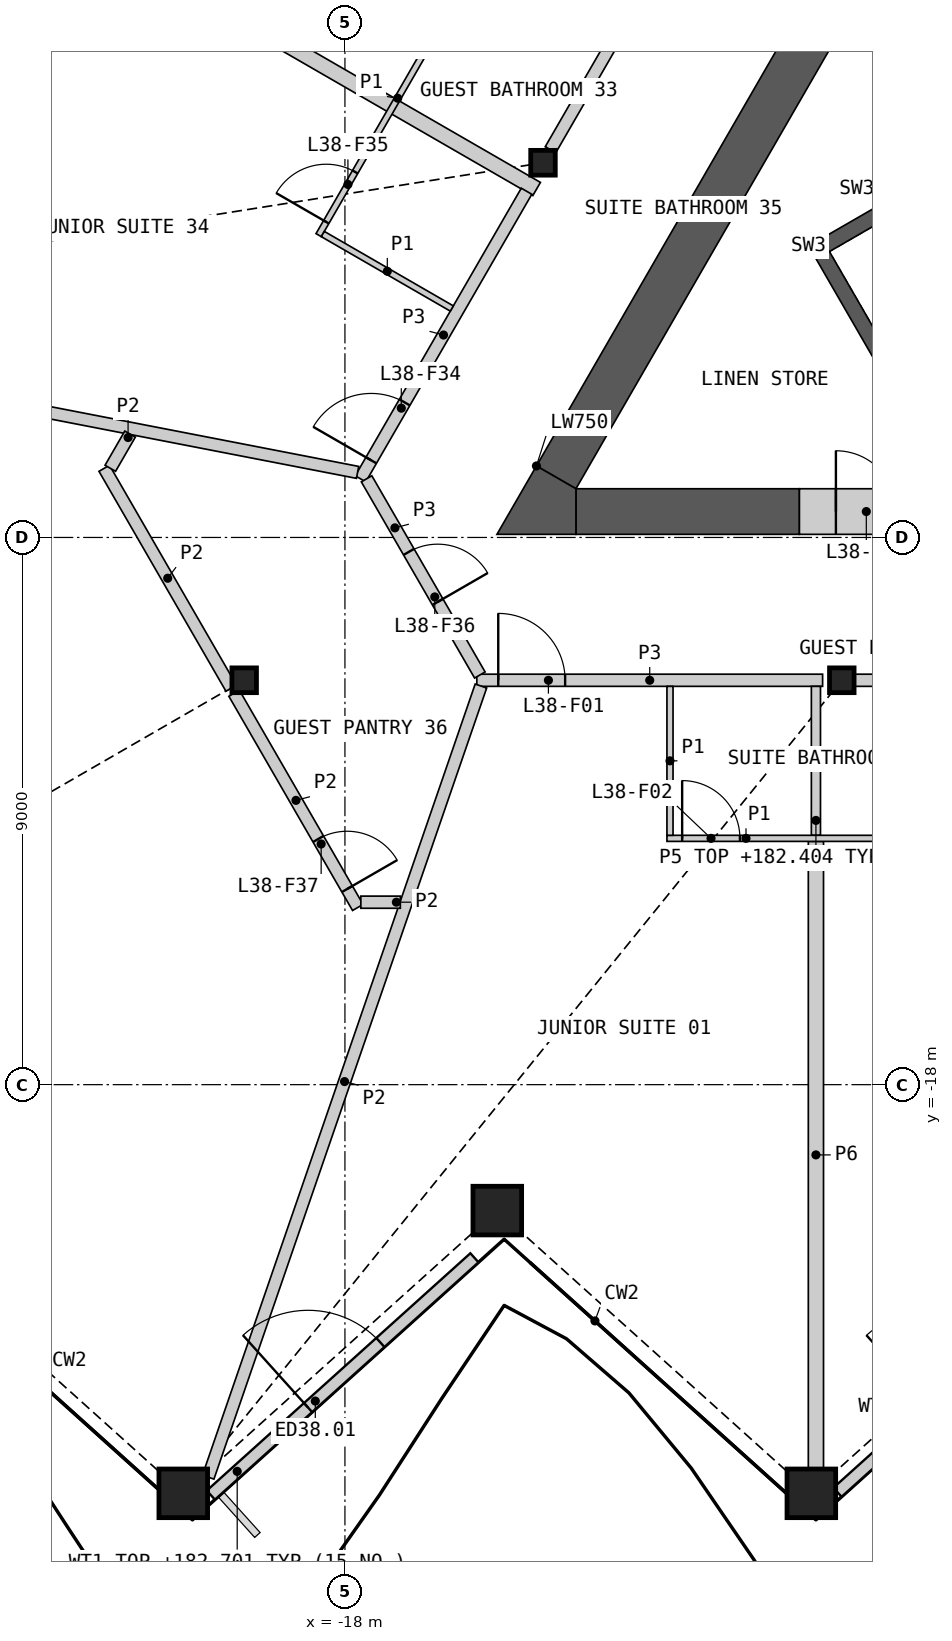
"""IFC4 building model, lengths in metres.
Left out: names, types, materials, properties, quantities, classifications, styles, units other than length and angle.
Written with IfcOpenShell. Run it as: python <this file> out.ifc"""

import sys

from ifc_helpers import new_model, si_unit, direction, frame, frame_2d, origin, origin_2d, place, context, subcontext, project, spatial, polyline, rectangle, hollow_rectangle, i_section, outline, extrude, element, fill, save


model = new_model("IFC4")
c1 = context("Model", 3, precision=1e-05, world=origin(), true_north=direction((0.0, 1.0)))
c2 = subcontext(c1, "Body", "Model", "MODEL_VIEW")
j1 = project(units=[si_unit("LENGTHUNIT", "METRE"), si_unit("PLANEANGLEUNIT", "RADIAN")], contexts=[c1])
p1 = place(None, origin())
s1 = spatial("IfcSite", under=j1, at=p1, CompositionType="ELEMENT")
p2 = place(p1, origin())
s2 = spatial("IfcBuilding", under=s1, at=p2, CompositionType="ELEMENT")
p3 = place(p2, frame((0.0, 0.0, 180.0)))
s3 = spatial("IfcBuildingStorey", under=s2, at=p3, CompositionType="ELEMENT", Elevation=180.0)
for number, where, z_axis, x_axis in (
    (1, (-20.659, -24.722, 0.0), (0.0, 0.0, 1.0), (1.0, 0.0, 0.0)),
    (2, (-15.494, -20.071, 0.0), (0.0, 0.0, 1.0), (1.0, 0.0, 0.0)),
    (3, (-10.329, -24.722, 0.0), (0.0, 0.0, 1.0), (1.0, 0.0, 0.0)),
):
    element("IfcColumn", number, at=place(p3, frame(where, z_axis=z_axis, x_axis=x_axis)), inside=s3, PredefinedType="COLUMN", context=c2, shape_type="SweptSolid", body=[
        extrude(hollow_rectangle(XDim=0.8, YDim=0.8, WallThickness=0.05, at=origin_2d()), origin(), (0.0, 0.0, 1.0), 3.6),
    ])
for number, where, z_axis, x_axis in (
    (4, (-14.743, -2.837, 0.0), (0.0, 0.0, 1.0), (1.0, 0.0, 0.0)),
    (5, (-19.657, -11.349, 0.0), (0.0, 0.0, 1.0), (1.0, 0.0, 0.0)),
    (6, (-9.828, -11.349, 0.0), (0.0, 0.0, 1.0), (1.0, 0.0, 0.0)),
):
    element("IfcColumn", number, at=place(p3, frame(where, z_axis=z_axis, x_axis=x_axis)), inside=s3, PredefinedType="COLUMN", context=c2, shape_type="SweptSolid", body=[
        extrude(i_section(OverallWidth=0.404, OverallDepth=0.407, WebThickness=0.027, FlangeThickness=0.044, at=origin_2d()), origin(), (0.0, 0.0, 1.0), 3.6),
    ])
p4 = place(p3, frame((-20.205, -24.751, 0.0), z_axis=(0.0, 0.0, 1.0), x_axis=(0.743135964011, 0.669140447883, 0.0)))
e7 = element("IfcWall", 7, at=p4, inside=s3, PredefinedType="SOLIDWALL", context=c2, shape_type="SweptSolid", body=[
    extrude(rectangle(XDim=5.833, YDim=0.2, at=frame_2d((2.917, 0.0))), origin(), (0.0, 0.0, 1.0), 2.701),
])
p5 = place(p4, frame((2.152, 0.0, 0.0)))
e8 = element("IfcOpeningElement", 8, at=p5, cuts=e7, PredefinedType="OPENING", context=c2, shape_type="SweptSolid", body=[
    extrude(rectangle(XDim=1.6, YDim=2.4, at=frame_2d((0.8, 1.2))), frame((0.0, 0.11, 0.0), z_axis=(0.0, -1.0, 0.0), x_axis=(1.0, 0.0, 0.0)), (0.0, 0.0, 1.0), 0.22),
])
p6 = place(p3, frame((-9.899, -24.704, 0.0), z_axis=(0.0, 0.0, 1.0), x_axis=(0.74312139518, 0.669156627424, 0.0)))
e9 = element("IfcWall", 9, at=p6, inside=s3, PredefinedType="SOLIDWALL", context=c2, shape_type="SweptSolid", body=[
    extrude(rectangle(XDim=5.763, YDim=0.2, at=frame_2d((2.882, 0.0))), origin(), (0.0, 0.0, 1.0), 2.701),
])
p7 = place(p6, frame((2.082, 0.0, 0.0)))
e10 = element("IfcOpeningElement", 10, at=p7, cuts=e9, PredefinedType="OPENING", context=c2, shape_type="SweptSolid", body=[
    extrude(rectangle(XDim=1.6, YDim=2.4, at=frame_2d((0.8, 1.2))), frame((0.0, 0.11, 0.0), z_axis=(0.0, -1.0, 0.0), x_axis=(1.0, 0.0, 0.0)), (0.0, 0.0, 1.0), 0.22),
])
p8 = place(p3, origin())
e11 = element("IfcWall", 11, at=p8, inside=s3, PredefinedType="SHEAR", context=c2, shape_type="SweptSolid", body=[
    extrude(outline(polyline([(-5.307, -1.281), (-10.374, -4.206), (-10.032, -4.298), (-5.182, -1.498), (-5.307, -1.281)])), origin(), (0.0, 0.0, 1.0), 3.25),
])
p9 = place(p3, origin())
e12 = element("IfcWall", 12, at=p9, inside=s3, PredefinedType="SHEAR", context=c2, shape_type="SweptSolid", body=[
    extrude(outline(polyline([(-10.374, -4.206), (-8.83, -6.881), (-8.738, -6.539), (-10.032, -4.298), (-10.374, -4.206)])), origin(), (0.0, 0.0, 1.0), 3.25),
])
p10 = place(p3, frame((-14.201, -8.574, 0.0), z_axis=(0.0, 0.0, 1.0), x_axis=(1.0, 0.0, 0.0)))
e13 = element("IfcWall", 13, at=p10, inside=s3, PredefinedType="SHEAR", context=c2, shape_type="SweptSolid", body=[
    extrude(rectangle(XDim=3.676, YDim=0.75, at=frame_2d((1.838, 0.0))), origin(), (0.0, 0.0, 1.0), 3.25),
])
p11 = place(p3, frame((-9.625, 0.477, 0.0), z_axis=(0.0, 0.0, 1.0), x_axis=(-0.499986234705, -0.866033351035, 0.0)))
e14 = element("IfcWall", 14, at=p11, inside=s3, PredefinedType="SHEAR", context=c2, shape_type="SweptSolid", body=[
    extrude(rectangle(XDim=9.801, YDim=0.75, at=frame_2d((4.9, 0.0))), origin(), (0.0, 0.0, 1.0), 3.25),
])
p12 = place(p3, origin())
e15 = element("IfcWall", 15, at=p12, inside=s3, PredefinedType="SHEAR", context=c2, shape_type="SweptSolid", body=[
    extrude(outline(polyline([(-14.851, -7.824), (-14.201, -8.199), (-14.201, -8.949), (-15.5, -8.949), (-14.851, -7.824)])), origin(), (0.0, 0.0, 1.0), 3.25),
])
p13 = place(p3, frame((-10.525, -8.574, 0.0), z_axis=(0.0, 0.0, 1.0), x_axis=(1.0, 0.0, 0.0)))
e16 = element("IfcWall", 16, at=p13, inside=s3, PredefinedType="SHEAR", context=c2, shape_type="SweptSolid", body=[
    extrude(rectangle(XDim=2.2, YDim=0.75, at=frame_2d((1.1, 0.0))), origin(), (0.0, 0.0, 1.0), 3.25),
])
p14 = place(p13, frame((0.6, 0.0, 0.0)))
e17 = element("IfcOpeningElement", 17, at=p14, cuts=e16, PredefinedType="OPENING", context=c2, shape_type="SweptSolid", body=[
    extrude(rectangle(XDim=1.0, YDim=2.1, at=frame_2d((0.5, 1.05))), frame((0.0, 0.385, 0.0), z_axis=(0.0, -1.0, 0.0), x_axis=(1.0, 0.0, 0.0)), (0.0, 0.0, 1.0), 0.77),
])
p15 = place(p3, frame((-26.164, 3.265, 0.0), z_axis=(0.0, 0.0, 1.0), x_axis=(0.866021313335, -0.500007084799, 0.0)))
e18 = element("IfcWall", 18, at=p15, inside=s3, PredefinedType="PARTITIONING", context=c2, shape_type="SweptSolid", body=[
    extrude(rectangle(XDim=13.068, YDim=0.25, at=frame_2d((6.534, 0.0))), origin(), (0.0, 0.0, 1.0), 2.404),
])
p16 = place(p3, frame((-10.254, -24.312, 0.0), z_axis=(0.0, 0.0, 1.0), x_axis=(0.0, 1.0, 0.0)))
e19 = element("IfcWall", 19, at=p16, inside=s3, PredefinedType="PARTITIONING", context=c2, shape_type="SweptSolid", body=[
    extrude(rectangle(XDim=10.313, YDim=0.25, at=frame_2d((5.156, 0.0))), origin(), (0.0, 0.0, 1.0), 2.404),
])
p17 = place(p3, frame((-9.615, -11.349, 0.0), z_axis=(0.0, 0.0, 1.0), x_axis=(1.0, 0.0, 0.0)))
e20 = element("IfcWall", 20, at=p17, inside=s3, PredefinedType="PARTITIONING", context=c2, shape_type="SweptSolid", body=[
    extrude(rectangle(XDim=9.401, YDim=0.2, at=frame_2d((4.701, 0.0))), origin(), (0.0, 0.0, 1.0), 3.25),
])
p18 = place(p17, frame((3.15, 0.0, 0.0)))
e21 = element("IfcOpeningElement", 21, at=p18, cuts=e20, PredefinedType="OPENING", context=c2, shape_type="SweptSolid", body=[
    extrude(rectangle(XDim=1.0, YDim=2.1, at=frame_2d((0.5, 1.05))), frame((0.0, 0.11, 0.0), z_axis=(0.0, -1.0, 0.0), x_axis=(1.0, 0.0, 0.0)), (0.0, 0.0, 1.0), 0.22),
])
p19 = place(p17, frame((4.851, 0.0, 0.0)))
e22 = element("IfcOpeningElement", 22, at=p19, cuts=e20, PredefinedType="OPENING", context=c2, shape_type="SweptSolid", body=[
    extrude(rectangle(XDim=1.0, YDim=2.1, at=frame_2d((0.5, 1.05))), frame((0.0, 0.11, 0.0), z_axis=(0.0, -1.0, 0.0), x_axis=(1.0, 0.0, 0.0)), (0.0, 0.0, 1.0), 0.22),
])
p20 = place(p3, frame((-14.619, -2.624, 0.0), z_axis=(0.0, 0.0, 1.0), x_axis=(0.50000393355, 0.866023132736, 0.0)))
e23 = element("IfcWall", 23, at=p20, inside=s3, PredefinedType="PARTITIONING", context=c2, shape_type="SweptSolid", body=[
    extrude(rectangle(XDim=9.335, YDim=0.2, at=frame_2d((4.667, 0.0))), origin(), (0.0, 0.0, 1.0), 3.25),
])
p21 = place(p20, frame((4.77, 0.0, 0.0)))
e24 = element("IfcOpeningElement", 24, at=p21, cuts=e23, PredefinedType="OPENING", context=c2, shape_type="SweptSolid", body=[
    extrude(rectangle(XDim=1.0, YDim=2.1, at=frame_2d((0.5, 1.05))), frame((0.0, 0.11, 0.0), z_axis=(0.0, -1.0, 0.0), x_axis=(1.0, 0.0, 0.0)), (0.0, 0.0, 1.0), 0.22),
])
p22 = place(p20, frame((3.163, 0.0, 0.0)))
e25 = element("IfcOpeningElement", 25, at=p22, cuts=e23, PredefinedType="OPENING", context=c2, shape_type="SweptSolid", body=[
    extrude(rectangle(XDim=1.0, YDim=2.1, at=frame_2d((0.5, 1.05))), frame((0.0, 0.11, 0.0), z_axis=(0.0, -1.0, 0.0), x_axis=(1.0, 0.0, 0.0)), (0.0, 0.0, 1.0), 0.22),
])
p23 = place(p3, frame((-15.831, -11.349, 0.0), z_axis=(0.0, 0.0, 1.0), x_axis=(1.0, 0.0, 0.0)))
e26 = element("IfcWall", 26, at=p23, inside=s3, PredefinedType="PARTITIONING", context=c2, shape_type="SweptSolid", body=[
    extrude(rectangle(XDim=5.687, YDim=0.2, at=frame_2d((2.843, 0.0))), origin(), (0.0, 0.0, 1.0), 3.25),
])
p24 = place(p23, frame((0.352, 0.0, 0.0)))
e27 = element("IfcOpeningElement", 27, at=p24, cuts=e26, PredefinedType="OPENING", context=c2, shape_type="SweptSolid", body=[
    extrude(rectangle(XDim=1.1, YDim=2.1, at=frame_2d((0.55, 1.05))), frame((0.0, 0.11, 0.0), z_axis=(0.0, -1.0, 0.0), x_axis=(1.0, 0.0, 0.0)), (0.0, 0.0, 1.0), 0.22),
])
p25 = place(p3, frame((-17.744, -8.035, 0.0), z_axis=(0.0, 0.0, 1.0), x_axis=(0.49998041698, 0.866036709751, 0.0)))
e28 = element("IfcWall", 28, at=p25, inside=s3, PredefinedType="PARTITIONING", context=c2, shape_type="SweptSolid", body=[
    extrude(rectangle(XDim=5.462, YDim=0.2, at=frame_2d((2.731, 0.0))), origin(), (0.0, 0.0, 1.0), 3.25),
])
p26 = place(p25, frame((0.352, 0.0, 0.0)))
e29 = element("IfcOpeningElement", 29, at=p26, cuts=e28, PredefinedType="OPENING", context=c2, shape_type="SweptSolid", body=[
    extrude(rectangle(XDim=1.1, YDim=2.1, at=frame_2d((0.55, 1.05))), frame((0.0, 0.11, 0.0), z_axis=(0.0, -1.0, 0.0), x_axis=(1.0, 0.0, 0.0)), (0.0, 0.0, 1.0), 0.22),
])
p27 = place(p3, frame((-17.644, -8.035, 0.0), z_axis=(0.0, 0.0, 1.0), x_axis=(0.499958791762, -0.866049194065, 0.0)))
e30 = element("IfcWall", 30, at=p27, inside=s3, PredefinedType="PARTITIONING", context=c2, shape_type="SweptSolid", body=[
    extrude(rectangle(XDim=3.726, YDim=0.2, at=frame_2d((1.863, 0.0))), origin(), (0.0, 0.0, 1.0), 3.25),
])
p28 = place(p27, frame((1.388, 0.0, 0.0)))
e31 = element("IfcOpeningElement", 31, at=p28, cuts=e30, PredefinedType="OPENING", context=c2, shape_type="SweptSolid", body=[
    extrude(rectangle(XDim=0.95, YDim=2.1, at=frame_2d((0.475, 1.05))), frame((0.0, 0.11, 0.0), z_axis=(0.0, -1.0, 0.0), x_axis=(1.0, 0.0, 0.0)), (0.0, 0.0, 1.0), 0.22),
])
p29 = place(p3, frame((-31.329, -5.303, 0.0), z_axis=(0.0, 0.0, 1.0), x_axis=(0.981696755608, -0.190450728612, 0.0)))
e32 = element("IfcWall", 32, at=p29, inside=s3, PredefinedType="PARTITIONING", context=c2, shape_type="SweptSolid", body=[
    extrude(rectangle(XDim=13.79, YDim=0.2, at=frame_2d((6.895, 0.0))), origin(), (0.0, 0.0, 1.0), 2.404),
])
p30 = place(p3, frame((-20.249, -24.455, 0.0), z_axis=(0.0, 0.0, 1.0), x_axis=(0.325902118519, 0.945403516571, 0.0)))
e33 = element("IfcWall", 33, at=p30, inside=s3, PredefinedType="PARTITIONING", context=c2, shape_type="SweptSolid", body=[
    extrude(rectangle(XDim=13.763, YDim=0.2, at=frame_2d((6.881, 0.0))), origin(), (0.0, 0.0, 1.0), 2.404),
])
p31 = place(p3, frame((-21.958, -7.862, 0.0), z_axis=(0.0, 0.0, 1.0), x_axis=(0.499987304225, -0.866032733569, 0.0)))
e34 = element("IfcWall", 34, at=p31, inside=s3, PredefinedType="PARTITIONING", context=c2, shape_type="SweptSolid", body=[
    extrude(rectangle(XDim=4.176, YDim=0.2, at=frame_2d((2.088, 0.0))), origin(), (0.0, 0.0, 1.0), 2.404),
])
p32 = place(p3, frame((-19.822, -11.562, 0.0), z_axis=(0.0, 0.0, 1.0), x_axis=(0.499992600721, -0.866029675718, 0.0)))
e35 = element("IfcWall", 35, at=p32, inside=s3, PredefinedType="PARTITIONING", context=c2, shape_type="SweptSolid", body=[
    extrude(rectangle(XDim=4.068, YDim=0.2, at=frame_2d((2.034, 0.0))), origin(), (0.0, 0.0, 1.0), 2.404),
])
p33 = place(p32, frame((2.767, 0.0, 0.0)))
e36 = element("IfcOpeningElement", 36, at=p33, cuts=e35, PredefinedType="OPENING", context=c2, shape_type="SweptSolid", body=[
    extrude(rectangle(XDim=0.95, YDim=2.1, at=frame_2d((0.475, 1.05))), frame((0.0, 0.11, 0.0), z_axis=(0.0, -1.0, 0.0), x_axis=(1.0, 0.0, 0.0)), (0.0, 0.0, 1.0), 0.22),
])
for number, where, z_axis, x_axis in (
    (37, (-21.859, -7.862, 0.0), (0.0, 0.0, 1.0), (0.5, 0.866, 0.0)),
    (38, (-17.738, -14.999, 0.0), (0.0, 0.0, 1.0), (1.0, 0.0, 0.0)),
):
    element("IfcWall", number, at=place(p3, frame(where, z_axis=z_axis, x_axis=x_axis)), inside=s3, PredefinedType="PARTITIONING", context=c2, shape_type="SweptSolid", body=[
        extrude(rectangle(XDim=0.649, YDim=0.2, at=frame_2d((0.325, 0.0))), origin(), (0.0, 0.0, 1.0), 2.404),
    ])
p34 = place(p3, frame((-10.254, -13.899, 0.0), z_axis=(0.0, 0.0, 1.0), x_axis=(0.0, 1.0, 0.0)))
e39 = element("IfcWall", 39, at=p34, inside=s3, PredefinedType="PLUMBINGWALL", context=c2, shape_type="SweptSolid", body=[
    extrude(rectangle(XDim=2.45, YDim=0.15, at=frame_2d((1.225, 0.0))), origin(), (0.0, 0.0, 1.0), 2.404),
])
p35 = place(p3, frame((-12.704, -13.949, 0.0), z_axis=(0.0, 0.0, 1.0), x_axis=(1.0, 0.0, 0.0)))
e40 = element("IfcWall", 40, at=p35, inside=s3, PredefinedType="PARTITIONING", context=c2, shape_type="SweptSolid", body=[
    extrude(rectangle(XDim=5.2, YDim=0.1, at=frame_2d((2.6, 0.0))), origin(), (0.0, 0.0, 1.0), 2.404),
])
p36 = place(p35, frame((0.25, 0.0, 0.0)))
e41 = element("IfcOpeningElement", 41, at=p36, cuts=e40, PredefinedType="OPENING", context=c2, shape_type="SweptSolid", body=[
    extrude(rectangle(XDim=0.95, YDim=2.1, at=frame_2d((0.475, 1.05))), frame((0.0, 0.06, 0.0), z_axis=(0.0, -1.0, 0.0), x_axis=(1.0, 0.0, 0.0)), (0.0, 0.0, 1.0), 0.12),
])
p37 = place(p35, frame((4.0, 0.0, 0.0)))
e42 = element("IfcOpeningElement", 42, at=p37, cuts=e40, PredefinedType="OPENING", context=c2, shape_type="SweptSolid", body=[
    extrude(rectangle(XDim=0.95, YDim=2.1, at=frame_2d((0.475, 1.05))), frame((0.0, 0.06, 0.0), z_axis=(0.0, -1.0, 0.0), x_axis=(1.0, 0.0, 0.0)), (0.0, 0.0, 1.0), 0.12),
])
p38 = place(p3, frame((-18.432, -4.028, 0.0), z_axis=(0.0, 0.0, 1.0), x_axis=(0.499992051641, 0.866029992723, 0.0)))
e43 = element("IfcWall", 43, at=p38, inside=s3, PredefinedType="PARTITIONING", context=c2, shape_type="SweptSolid", body=[
    extrude(rectangle(XDim=5.2, YDim=0.1, at=frame_2d((2.6, 0.0))), origin(), (0.0, 0.0, 1.0), 2.404),
])
p39 = place(p38, frame((4.0, 0.0, 0.0)))
e44 = element("IfcOpeningElement", 44, at=p39, cuts=e43, PredefinedType="OPENING", context=c2, shape_type="SweptSolid", body=[
    extrude(rectangle(XDim=0.95, YDim=2.1, at=frame_2d((0.475, 1.05))), frame((0.0, 0.06, 0.0), z_axis=(0.0, -1.0, 0.0), x_axis=(1.0, 0.0, 0.0)), (0.0, 0.0, 1.0), 0.12),
])
p40 = place(p38, frame((0.25, 0.0, 0.0)))
e45 = element("IfcOpeningElement", 45, at=p40, cuts=e43, PredefinedType="OPENING", context=c2, shape_type="SweptSolid", body=[
    extrude(rectangle(XDim=0.95, YDim=2.1, at=frame_2d((0.475, 1.05))), frame((0.0, 0.06, 0.0), z_axis=(0.0, -1.0, 0.0), x_axis=(1.0, 0.0, 0.0)), (0.0, 0.0, 1.0), 0.12),
])
for number, where, z_axis, x_axis in (
    (46, (-18.364, -4.01, 0.0), (0.0, 0.0, 1.0), (0.866, -0.5, 0.0)),
    (47, (-12.654, -13.899, 0.0), (0.0, 0.0, 1.0), (0.0, 1.0, 0.0)),
):
    element("IfcWall", number, at=place(p3, frame(where, z_axis=z_axis, x_axis=x_axis)), inside=s3, PredefinedType="PARTITIONING", context=c2, shape_type="SweptSolid", body=[
        extrude(rectangle(XDim=2.45, YDim=0.1, at=frame_2d((1.225, 0.0))), origin(), (0.0, 0.0, 1.0), 2.404),
    ])
p41 = place(p5, origin())
e48 = element("IfcDoor", 48, at=p41, inside=s3, OperationType="DOUBLE_DOOR_SINGLE_SWING", PredefinedType="DOOR", context=c2, shape_type="SweptSolid", body=[
    extrude(rectangle(XDim=1.6, YDim=2.4, at=frame_2d((0.8, 1.2))), frame((0.0, 0.025, 0.0), z_axis=(0.0, -1.0, 0.0), x_axis=(1.0, 0.0, 0.0)), (0.0, 0.0, 1.0), 0.05),
])
fill(e8, e48)
p42 = place(p14, origin())
e49 = element("IfcDoor", 49, at=p42, inside=s3, OperationType="SINGLE_SWING_LEFT", PredefinedType="DOOR", context=c2, shape_type="SweptSolid", body=[
    extrude(rectangle(XDim=1.0, YDim=2.1, at=frame_2d((0.5, 1.05))), frame((0.0, 0.13, 0.0), z_axis=(0.0, -1.0, 0.0), x_axis=(1.0, 0.0, 0.0)), (0.0, 0.0, 1.0), 0.05),
])
fill(e17, e49)
p43 = place(p24, origin())
e50 = element("IfcDoor", 50, at=p43, inside=s3, OperationType="SINGLE_SWING_LEFT", PredefinedType="DOOR", context=c2, shape_type="SweptSolid", body=[
    extrude(rectangle(XDim=1.1, YDim=2.1, at=frame_2d((0.55, 1.05))), frame((0.0, 0.025, 0.0), z_axis=(0.0, -1.0, 0.0), x_axis=(1.0, 0.0, 0.0)), (0.0, 0.0, 1.0), 0.05),
])
fill(e27, e50)
p44 = place(p36, origin())
e51 = element("IfcDoor", 51, at=p44, inside=s3, OperationType="SINGLE_SWING_LEFT", PredefinedType="DOOR", context=c2, shape_type="SweptSolid", body=[
    extrude(rectangle(XDim=0.95, YDim=2.1, at=frame_2d((0.475, 1.05))), frame((0.0, 0.025, 0.0), z_axis=(0.0, -1.0, 0.0), x_axis=(1.0, 0.0, 0.0)), (0.0, 0.0, 1.0), 0.05),
])
fill(e41, e51)
p45 = place(p26, origin())
e52 = element("IfcDoor", 52, at=p45, inside=s3, OperationType="SINGLE_SWING_LEFT", PredefinedType="DOOR", context=c2, shape_type="SweptSolid", body=[
    extrude(rectangle(XDim=1.1, YDim=2.1, at=frame_2d((0.55, 1.05))), frame((0.0, 0.025, 0.0), z_axis=(0.0, -1.0, 0.0), x_axis=(1.0, 0.0, 0.0)), (0.0, 0.0, 1.0), 0.05),
])
fill(e29, e52)
p46 = place(p40, origin())
e53 = element("IfcDoor", 53, at=p46, inside=s3, OperationType="SINGLE_SWING_LEFT", PredefinedType="DOOR", context=c2, shape_type="SweptSolid", body=[
    extrude(rectangle(XDim=0.95, YDim=2.1, at=frame_2d((0.475, 1.05))), frame((0.0, 0.025, 0.0), z_axis=(0.0, -1.0, 0.0), x_axis=(1.0, 0.0, 0.0)), (0.0, 0.0, 1.0), 0.05),
])
fill(e45, e53)
p47 = place(p28, origin())
e54 = element("IfcDoor", 54, at=p47, inside=s3, OperationType="SINGLE_SWING_RIGHT", PredefinedType="DOOR", context=c2, shape_type="SweptSolid", body=[
    extrude(rectangle(XDim=0.95, YDim=2.1, at=frame_2d((0.475, 1.05))), frame((0.0, 0.025, 0.0), z_axis=(0.0, -1.0, 0.0), x_axis=(1.0, 0.0, 0.0)), (0.0, 0.0, 1.0), 0.05),
])
fill(e31, e54)
p48 = place(p33, origin())
e55 = element("IfcDoor", 55, at=p48, inside=s3, OperationType="SINGLE_SWING_RIGHT", PredefinedType="DOOR", context=c2, shape_type="SweptSolid", body=[
    extrude(rectangle(XDim=0.95, YDim=2.1, at=frame_2d((0.475, 1.05))), frame((0.0, 0.025, 0.0), z_axis=(0.0, -1.0, 0.0), x_axis=(1.0, 0.0, 0.0)), (0.0, 0.0, 1.0), 0.05),
])
fill(e36, e55)
save(model, sys.argv[1])
